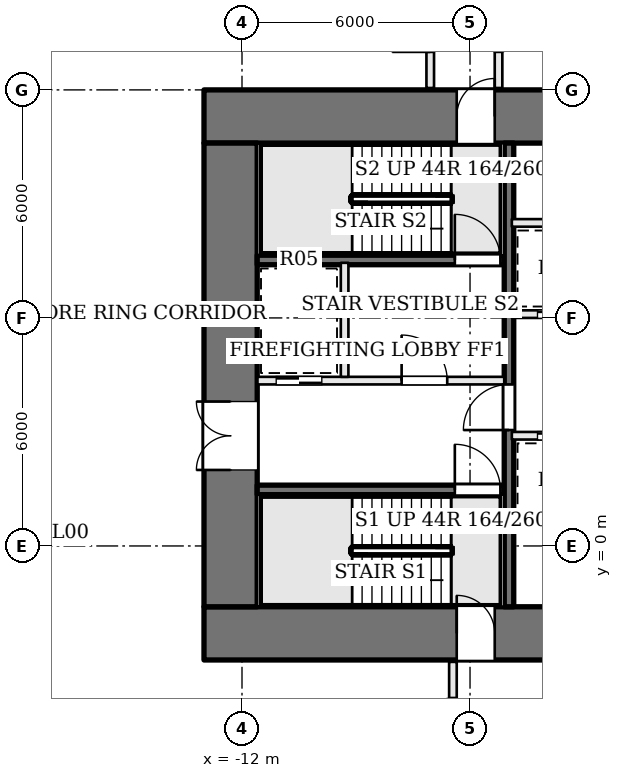
"""IFC4 building model, lengths in metres.
Left out: names, types, materials, properties, quantities, classifications, styles, units other than length and angle.
Written with IfcOpenShell. Run it as: python <this file> out.ifc"""

import sys

from ifc_helpers import new_model, si_unit, direction, frame, frame_2d, origin, place, context, subcontext, project, spatial, rectangle, extrude, element, fill, save


model = new_model("IFC4")
c1 = context("Model", 3, precision=1e-05, world=origin(), true_north=direction((0.0, 1.0)))
c2 = subcontext(c1, "Body", "Model", "MODEL_VIEW")
j1 = project(units=[si_unit("LENGTHUNIT", "METRE"), si_unit("PLANEANGLEUNIT", "RADIAN")], contexts=[c1])
p1 = place(None, origin())
s1 = spatial("IfcSite", under=j1, at=p1, CompositionType="ELEMENT")
p2 = place(p1, origin())
s2 = spatial("IfcBuilding", under=s1, at=p2, CompositionType="ELEMENT")
p3 = place(p2, origin())
s3 = spatial("IfcBuildingStorey", under=s2, at=p3, CompositionType="ELEMENT", Elevation=0.0)
p4 = place(p3, frame((-13.0, 11.3, 0.0), z_axis=(0.0, 0.0, 1.0), x_axis=(1.0, 0.0, 0.0)))
e1 = element("IfcWall", 1, at=p4, inside=s3, PredefinedType="SHEAR", context=c2, shape_type="SweptSolid", body=[
    extrude(rectangle(XDim=26.0, YDim=1.4, at=frame_2d((13.0, 0.0))), origin(), (0.0, 0.0, 1.0), 7.2),
])
p5 = place(p4, frame((8.975, 0.0, 0.0)))
e2 = element("IfcOpeningElement", 2, at=p5, cuts=e1, PredefinedType="OPENING", context=c2, shape_type="SweptSolid", body=[
    extrude(rectangle(XDim=0.7, YDim=2.1, at=frame_2d((0.35, 1.05))), frame((0.0, 0.71, 0.0), z_axis=(0.0, -1.0, 0.0), x_axis=(1.0, 0.0, 0.0)), (0.0, 0.0, 1.0), 1.42),
])
p6 = place(p4, frame((11.425, 0.0, 0.0)))
e3 = element("IfcOpeningElement", 3, at=p6, cuts=e1, PredefinedType="OPENING", context=c2, shape_type="SweptSolid", body=[
    extrude(rectangle(XDim=0.7, YDim=2.1, at=frame_2d((0.35, 1.05))), frame((0.0, 0.71, 0.0), z_axis=(0.0, -1.0, 0.0), x_axis=(1.0, 0.0, 0.0)), (0.0, 0.0, 1.0), 1.42),
])
p7 = place(p4, frame((13.725, 0.0, 0.0)))
e4 = element("IfcOpeningElement", 4, at=p7, cuts=e1, PredefinedType="OPENING", context=c2, shape_type="SweptSolid", body=[
    extrude(rectangle(XDim=1.0, YDim=2.1, at=frame_2d((0.5, 1.05))), frame((0.0, 0.71, 0.0), z_axis=(0.0, -1.0, 0.0), x_axis=(1.0, 0.0, 0.0)), (0.0, 0.0, 1.0), 1.42),
])
p8 = place(p4, frame((15.65, 0.0, 0.0)))
e5 = element("IfcOpeningElement", 5, at=p8, cuts=e1, PredefinedType="OPENING", context=c2, shape_type="SweptSolid", body=[
    extrude(rectangle(XDim=1.0, YDim=2.1, at=frame_2d((0.5, 1.05))), frame((0.0, 0.71, 0.0), z_axis=(0.0, -1.0, 0.0), x_axis=(1.0, 0.0, 0.0)), (0.0, 0.0, 1.0), 1.42),
])
p9 = place(p4, frame((6.65, 0.0, 0.0)))
e6 = element("IfcOpeningElement", 6, at=p9, cuts=e1, PredefinedType="OPENING", context=c2, shape_type="SweptSolid", body=[
    extrude(rectangle(XDim=1.0, YDim=2.1, at=frame_2d((0.5, 1.05))), frame((0.0, 0.71, 0.0), z_axis=(0.0, -1.0, 0.0), x_axis=(1.0, 0.0, 0.0)), (0.0, 0.0, 1.0), 1.42),
])
p10 = place(p4, frame((18.35, 0.0, 0.0)))
e7 = element("IfcOpeningElement", 7, at=p10, cuts=e1, PredefinedType="OPENING", context=c2, shape_type="SweptSolid", body=[
    extrude(rectangle(XDim=1.0, YDim=2.1, at=frame_2d((0.5, 1.05))), frame((0.0, 0.71, 0.0), z_axis=(0.0, -1.0, 0.0), x_axis=(1.0, 0.0, 0.0)), (0.0, 0.0, 1.0), 1.42),
])
p11 = place(p3, frame((-13.0, -2.3, 0.0), z_axis=(0.0, 0.0, 1.0), x_axis=(1.0, 0.0, 0.0)))
e8 = element("IfcWall", 8, at=p11, inside=s3, PredefinedType="SHEAR", context=c2, shape_type="SweptSolid", body=[
    extrude(rectangle(XDim=26.0, YDim=1.4, at=frame_2d((13.0, 0.0))), origin(), (0.0, 0.0, 1.0), 7.2),
])
p12 = place(p11, frame((9.275, 0.0, 0.0)))
e9 = element("IfcOpeningElement", 9, at=p12, cuts=e8, PredefinedType="OPENING", context=c2, shape_type="SweptSolid", body=[
    extrude(rectangle(XDim=0.9, YDim=2.1, at=frame_2d((0.45, 1.05))), frame((0.0, 0.71, 0.0), z_axis=(0.0, -1.0, 0.0), x_axis=(1.0, 0.0, 0.0)), (0.0, 0.0, 1.0), 1.42),
])
p13 = place(p11, frame((12.525, 0.0, 0.0)))
e10 = element("IfcOpeningElement", 10, at=p13, cuts=e8, PredefinedType="OPENING", context=c2, shape_type="SweptSolid", body=[
    extrude(rectangle(XDim=0.9, YDim=2.1, at=frame_2d((0.45, 1.05))), frame((0.0, 0.71, 0.0), z_axis=(0.0, -1.0, 0.0), x_axis=(1.0, 0.0, 0.0)), (0.0, 0.0, 1.0), 1.42),
])
p14 = place(p11, frame((15.0, 0.0, 0.0)))
e11 = element("IfcOpeningElement", 11, at=p14, cuts=e8, PredefinedType="OPENING", context=c2, shape_type="SweptSolid", body=[
    extrude(rectangle(XDim=1.0, YDim=2.1, at=frame_2d((0.5, 1.05))), frame((0.0, 0.71, 0.0), z_axis=(0.0, -1.0, 0.0), x_axis=(1.0, 0.0, 0.0)), (0.0, 0.0, 1.0), 1.42),
])
p15 = place(p11, frame((16.7, 0.0, 0.0)))
e12 = element("IfcOpeningElement", 12, at=p15, cuts=e8, PredefinedType="OPENING", context=c2, shape_type="SweptSolid", body=[
    extrude(rectangle(XDim=0.9, YDim=2.1, at=frame_2d((0.45, 1.05))), frame((0.0, 0.71, 0.0), z_axis=(0.0, -1.0, 0.0), x_axis=(1.0, 0.0, 0.0)), (0.0, 0.0, 1.0), 1.42),
])
p16 = place(p11, frame((6.65, 0.0, 0.0)))
e13 = element("IfcOpeningElement", 13, at=p16, cuts=e8, PredefinedType="OPENING", context=c2, shape_type="SweptSolid", body=[
    extrude(rectangle(XDim=1.0, YDim=2.1, at=frame_2d((0.5, 1.05))), frame((0.0, 0.71, 0.0), z_axis=(0.0, -1.0, 0.0), x_axis=(1.0, 0.0, 0.0)), (0.0, 0.0, 1.0), 1.42),
])
p17 = place(p11, frame((18.35, 0.0, 0.0)))
e14 = element("IfcOpeningElement", 14, at=p17, cuts=e8, PredefinedType="OPENING", context=c2, shape_type="SweptSolid", body=[
    extrude(rectangle(XDim=1.0, YDim=2.1, at=frame_2d((0.5, 1.05))), frame((0.0, 0.71, 0.0), z_axis=(0.0, -1.0, 0.0), x_axis=(1.0, 0.0, 0.0)), (0.0, 0.0, 1.0), 1.42),
])
p18 = place(p3, frame((-12.3, -1.6, 0.0), z_axis=(0.0, 0.0, 1.0), x_axis=(0.0, 1.0, 0.0)))
e15 = element("IfcWall", 15, at=p18, inside=s3, PredefinedType="SHEAR", context=c2, shape_type="SweptSolid", body=[
    extrude(rectangle(XDim=12.2, YDim=1.4, at=frame_2d((6.1, 0.0))), origin(), (0.0, 0.0, 1.0), 7.2),
])
p19 = place(p18, frame((3.6, 0.0, 0.0)))
e16 = element("IfcOpeningElement", 16, at=p19, cuts=e15, PredefinedType="OPENING", context=c2, shape_type="SweptSolid", body=[
    extrude(rectangle(XDim=1.8, YDim=2.1, at=frame_2d((0.9, 1.05))), frame((0.0, 0.71, 0.0), z_axis=(0.0, -1.0, 0.0), x_axis=(1.0, 0.0, 0.0)), (0.0, 0.0, 1.0), 1.42),
])
p20 = place(p3, frame((-11.6, 1.475, 0.0), z_axis=(0.0, 0.0, 1.0), x_axis=(1.0, 0.0, 0.0)))
e17 = element("IfcWall", 17, at=p20, inside=s3, PredefinedType="SOLIDWALL", context=c2, shape_type="SweptSolid", body=[
    extrude(rectangle(XDim=6.5, YDim=0.25, at=frame_2d((3.25, 0.0))), origin(), (0.0, 0.0, 1.0), 6.95),
])
p21 = place(p20, frame((5.2, 0.0, 0.0)))
e18 = element("IfcOpeningElement", 18, at=p21, cuts=e17, PredefinedType="OPENING", context=c2, shape_type="SweptSolid", body=[
    extrude(rectangle(XDim=1.2, YDim=2.1, at=frame_2d((0.6, 1.05))), frame((0.0, 0.135, 0.0), z_axis=(0.0, -1.0, 0.0), x_axis=(1.0, 0.0, 0.0)), (0.0, 0.0, 1.0), 0.27),
])
p22 = place(p3, frame((-11.6, 4.35, 0.0), z_axis=(0.0, 0.0, 1.0), x_axis=(1.0, 0.0, 0.0)))
e19 = element("IfcWall", 19, at=p22, inside=s3, PredefinedType="SOLIDWALL", context=c2, shape_type="SweptSolid", body=[
    extrude(rectangle(XDim=6.5, YDim=0.2, at=frame_2d((3.25, 0.0))), origin(), (0.0, 0.0, 1.0), 6.95),
])
p23 = place(p22, frame((3.8, 0.0, 0.0)))
e20 = element("IfcOpeningElement", 20, at=p23, cuts=e19, PredefinedType="OPENING", context=c2, shape_type="SweptSolid", body=[
    extrude(rectangle(XDim=1.2, YDim=2.1, at=frame_2d((0.6, 1.05))), frame((0.0, 0.11, 0.0), z_axis=(0.0, -1.0, 0.0), x_axis=(1.0, 0.0, 0.0)), (0.0, 0.0, 1.0), 0.22),
])
p24 = place(p22, frame((0.5, 0.0, 0.0)))
e21 = element("IfcOpeningElement", 21, at=p24, cuts=e19, PredefinedType="OPENING", context=c2, shape_type="SweptSolid", body=[
    extrude(rectangle(XDim=1.2, YDim=2.1, at=frame_2d((0.6, 1.05))), frame((0.0, 0.11, 0.0), z_axis=(0.0, -1.0, 0.0), x_axis=(1.0, 0.0, 0.0)), (0.0, 0.0, 1.0), 0.22),
])
p25 = place(p3, frame((-11.6, 7.525, 0.0), z_axis=(0.0, 0.0, 1.0), x_axis=(1.0, 0.0, 0.0)))
e22 = element("IfcWall", 22, at=p25, inside=s3, PredefinedType="SOLIDWALL", context=c2, shape_type="SweptSolid", body=[
    extrude(rectangle(XDim=6.5, YDim=0.25, at=frame_2d((3.25, 0.0))), origin(), (0.0, 0.0, 1.0), 6.95),
])
p26 = place(p25, frame((5.2, 0.0, 0.0)))
e23 = element("IfcOpeningElement", 23, at=p26, cuts=e22, PredefinedType="OPENING", context=c2, shape_type="SweptSolid", body=[
    extrude(rectangle(XDim=1.2, YDim=2.1, at=frame_2d((0.6, 1.05))), frame((0.0, 0.135, 0.0), z_axis=(0.0, -1.0, 0.0), x_axis=(1.0, 0.0, 0.0)), (0.0, 0.0, 1.0), 0.27),
])
p27 = place(p3, frame((-9.3, 4.45, 0.0), z_axis=(0.0, 0.0, 1.0), x_axis=(0.0, 1.0, 0.0)))
e24 = element("IfcWall", 24, at=p27, inside=s3, PredefinedType="SOLIDWALL", context=c2, shape_type="SweptSolid", body=[
    extrude(rectangle(XDim=3.0, YDim=0.2, at=frame_2d((1.5, 0.0))), origin(), (0.0, 0.0, 1.0), 6.95),
])
p28 = place(p3, frame((-4.975, -1.6, 0.0), z_axis=(0.0, 0.0, 1.0), x_axis=(0.0, 1.0, 0.0)))
e25 = element("IfcWall", 25, at=p28, inside=s3, PredefinedType="SOLIDWALL", context=c2, shape_type="SweptSolid", body=[
    extrude(rectangle(XDim=12.2, YDim=0.25, at=frame_2d((6.1, 0.0))), origin(), (0.0, 0.0, 1.0), 6.95),
])
p29 = place(p28, frame((4.65, 0.0, 0.0)))
e26 = element("IfcOpeningElement", 26, at=p29, cuts=e25, PredefinedType="OPENING", context=c2, shape_type="SweptSolid", body=[
    extrude(rectangle(XDim=1.2, YDim=2.1, at=frame_2d((0.6, 1.05))), frame((0.0, 0.135, 0.0), z_axis=(0.0, -1.0, 0.0), x_axis=(1.0, 0.0, 0.0)), (0.0, 0.0, 1.0), 0.27),
])
p30 = place(p3, frame((-4.9, 0.5, 0.0), z_axis=(0.0, 0.0, 1.0), x_axis=(1.0, 0.0, 0.0)))
e27 = element("IfcWall", 27, at=p30, inside=s3, PredefinedType="SOLIDWALL", context=c2, shape_type="SweptSolid", body=[
    extrude(rectangle(XDim=9.8, YDim=0.2, at=frame_2d((4.9, 0.0))), origin(), (0.0, 0.0, 1.0), 6.95),
])
p31 = place(p3, frame((-4.9, 2.9, 0.0), z_axis=(0.0, 0.0, 1.0), x_axis=(1.0, 0.0, 0.0)))
e28 = element("IfcWall", 28, at=p31, inside=s3, PredefinedType="SOLIDWALL", context=c2, shape_type="SweptSolid", body=[
    extrude(rectangle(XDim=9.8, YDim=0.2, at=frame_2d((4.9, 0.0))), origin(), (0.0, 0.0, 1.0), 6.95),
])
p32 = place(p31, frame((0.675, 0.0, 0.0)))
e29 = element("IfcOpeningElement", 29, at=p32, cuts=e28, PredefinedType="OPENING", context=c2, shape_type="SweptSolid", body=[
    extrude(rectangle(XDim=1.1, YDim=2.1, at=frame_2d((0.55, 1.05))), frame((0.0, 0.11, 0.0), z_axis=(0.0, -1.0, 0.0), x_axis=(1.0, 0.0, 0.0)), (0.0, 0.0, 1.0), 0.22),
])
p33 = place(p31, frame((3.125, 0.0, 0.0)))
e30 = element("IfcOpeningElement", 30, at=p33, cuts=e28, PredefinedType="OPENING", context=c2, shape_type="SweptSolid", body=[
    extrude(rectangle(XDim=1.1, YDim=2.1, at=frame_2d((0.55, 1.05))), frame((0.0, 0.11, 0.0), z_axis=(0.0, -1.0, 0.0), x_axis=(1.0, 0.0, 0.0)), (0.0, 0.0, 1.0), 0.22),
])
p34 = place(p31, frame((5.575, 0.0, 0.0)))
e31 = element("IfcOpeningElement", 31, at=p34, cuts=e28, PredefinedType="OPENING", context=c2, shape_type="SweptSolid", body=[
    extrude(rectangle(XDim=1.1, YDim=2.1, at=frame_2d((0.55, 1.05))), frame((0.0, 0.11, 0.0), z_axis=(0.0, -1.0, 0.0), x_axis=(1.0, 0.0, 0.0)), (0.0, 0.0, 1.0), 0.22),
])
p35 = place(p31, frame((8.025, 0.0, 0.0)))
e32 = element("IfcOpeningElement", 32, at=p35, cuts=e28, PredefinedType="OPENING", context=c2, shape_type="SweptSolid", body=[
    extrude(rectangle(XDim=1.1, YDim=2.1, at=frame_2d((0.55, 1.05))), frame((0.0, 0.11, 0.0), z_axis=(0.0, -1.0, 0.0), x_axis=(1.0, 0.0, 0.0)), (0.0, 0.0, 1.0), 0.22),
])
p36 = place(p3, frame((-4.9, 6.1, 0.0), z_axis=(0.0, 0.0, 1.0), x_axis=(1.0, 0.0, 0.0)))
e33 = element("IfcWall", 33, at=p36, inside=s3, PredefinedType="SOLIDWALL", context=c2, shape_type="SweptSolid", body=[
    extrude(rectangle(XDim=9.8, YDim=0.2, at=frame_2d((4.9, 0.0))), origin(), (0.0, 0.0, 1.0), 6.95),
])
p37 = place(p36, frame((0.675, 0.0, 0.0)))
e34 = element("IfcOpeningElement", 34, at=p37, cuts=e33, PredefinedType="OPENING", context=c2, shape_type="SweptSolid", body=[
    extrude(rectangle(XDim=1.1, YDim=2.1, at=frame_2d((0.55, 1.05))), frame((0.0, 0.11, 0.0), z_axis=(0.0, -1.0, 0.0), x_axis=(1.0, 0.0, 0.0)), (0.0, 0.0, 1.0), 0.22),
])
p38 = place(p36, frame((3.125, 0.0, 0.0)))
e35 = element("IfcOpeningElement", 35, at=p38, cuts=e33, PredefinedType="OPENING", context=c2, shape_type="SweptSolid", body=[
    extrude(rectangle(XDim=1.1, YDim=2.1, at=frame_2d((0.55, 1.05))), frame((0.0, 0.11, 0.0), z_axis=(0.0, -1.0, 0.0), x_axis=(1.0, 0.0, 0.0)), (0.0, 0.0, 1.0), 0.22),
])
p39 = place(p36, frame((5.575, 0.0, 0.0)))
e36 = element("IfcOpeningElement", 36, at=p39, cuts=e33, PredefinedType="OPENING", context=c2, shape_type="SweptSolid", body=[
    extrude(rectangle(XDim=1.1, YDim=2.1, at=frame_2d((0.55, 1.05))), frame((0.0, 0.11, 0.0), z_axis=(0.0, -1.0, 0.0), x_axis=(1.0, 0.0, 0.0)), (0.0, 0.0, 1.0), 0.22),
])
p40 = place(p36, frame((8.025, 0.0, 0.0)))
e37 = element("IfcOpeningElement", 37, at=p40, cuts=e33, PredefinedType="OPENING", context=c2, shape_type="SweptSolid", body=[
    extrude(rectangle(XDim=1.1, YDim=2.1, at=frame_2d((0.55, 1.05))), frame((0.0, 0.11, 0.0), z_axis=(0.0, -1.0, 0.0), x_axis=(1.0, 0.0, 0.0)), (0.0, 0.0, 1.0), 0.22),
])
p41 = place(p3, frame((-4.9, 8.5, 0.0), z_axis=(0.0, 0.0, 1.0), x_axis=(1.0, 0.0, 0.0)))
e38 = element("IfcWall", 38, at=p41, inside=s3, PredefinedType="SOLIDWALL", context=c2, shape_type="SweptSolid", body=[
    extrude(rectangle(XDim=9.8, YDim=0.2, at=frame_2d((4.9, 0.0))), origin(), (0.0, 0.0, 1.0), 6.95),
])
p42 = place(p3, frame((-6.45, -22.097, 0.0), z_axis=(0.0, 0.0, 1.0), x_axis=(0.0, 1.0, 0.0)))
e39 = element("IfcWall", 39, at=p42, inside=s3, PredefinedType="PARTITIONING", context=c2, shape_type="SweptSolid", body=[
    extrude(rectangle(XDim=19.047, YDim=0.2, at=frame_2d((9.523, 0.0))), origin(), (0.0, 0.0, 1.0), 6.23),
])
p43 = place(p42, frame((17.097, 0.0, 0.0)))
e40 = element("IfcOpeningElement", 40, at=p43, cuts=e39, PredefinedType="OPENING", context=c2, shape_type="SweptSolid", body=[
    extrude(rectangle(XDim=1.0, YDim=2.1, at=frame_2d((0.5, 1.05))), frame((0.0, 0.11, 0.0), z_axis=(0.0, -1.0, 0.0), x_axis=(1.0, 0.0, 0.0)), (0.0, 0.0, 1.0), 0.22),
])
p44 = place(p3, frame((-7.047, 12.05, 0.0), z_axis=(0.0, 0.0, 1.0), x_axis=(0.0, 1.0, 0.0)))
e41 = element("IfcWall", 41, at=p44, inside=s3, PredefinedType="PARTITIONING", context=c2, shape_type="SweptSolid", body=[
    extrude(rectangle(XDim=9.98, YDim=0.2, at=frame_2d((4.99, 0.0))), origin(), (0.0, 0.0, 1.0), 6.23),
])
p45 = place(p44, frame((0.95, 0.0, 0.0)))
e42 = element("IfcOpeningElement", 42, at=p45, cuts=e41, PredefinedType="OPENING", context=c2, shape_type="SweptSolid", body=[
    extrude(rectangle(XDim=1.0, YDim=2.1, at=frame_2d((0.5, 1.05))), frame((0.0, 0.11, 0.0), z_axis=(0.0, -1.0, 0.0), x_axis=(1.0, 0.0, 0.0)), (0.0, 0.0, 1.0), 0.22),
])
p46 = place(p3, frame((-5.25, 22.21, 0.0), z_axis=(0.0, 0.0, 1.0), x_axis=(0.0, -1.0, 0.0)))
e43 = element("IfcWall", 43, at=p46, inside=s3, PredefinedType="PARTITIONING", context=c2, shape_type="SweptSolid", body=[
    extrude(rectangle(XDim=10.16, YDim=0.2, at=frame_2d((5.08, 0.0))), origin(), (0.0, 0.0, 1.0), 6.23),
])
p47 = place(p46, frame((8.21, 0.0, 0.0)))
e44 = element("IfcOpeningElement", 44, at=p47, cuts=e43, PredefinedType="OPENING", context=c2, shape_type="SweptSolid", body=[
    extrude(rectangle(XDim=1.0, YDim=2.1, at=frame_2d((0.5, 1.05))), frame((0.0, 0.11, 0.0), z_axis=(0.0, -1.0, 0.0), x_axis=(1.0, 0.0, 0.0)), (0.0, 0.0, 1.0), 0.22),
])
p48 = place(p19, origin())
e45 = element("IfcDoor", 45, at=p48, inside=s3, OperationType="DOUBLE_DOOR_SINGLE_SWING", PredefinedType="DOOR", context=c2, shape_type="SweptSolid", body=[
    extrude(rectangle(XDim=1.8, YDim=2.1, at=frame_2d((0.9, 1.05))), frame((0.0, 0.025, 0.0), z_axis=(0.0, -1.0, 0.0), x_axis=(1.0, 0.0, 0.0)), (0.0, 0.0, 1.0), 0.05),
])
fill(e16, e45)
p49 = place(p29, origin())
e46 = element("IfcDoor", 46, at=p49, inside=s3, OperationType="SINGLE_SWING_LEFT", PredefinedType="DOOR", context=c2, shape_type="SweptSolid", body=[
    extrude(rectangle(XDim=1.2, YDim=2.1, at=frame_2d((0.6, 1.05))), frame((0.0, 0.025, 0.0), z_axis=(0.0, -1.0, 0.0), x_axis=(1.0, 0.0, 0.0)), (0.0, 0.0, 1.0), 0.05),
])
fill(e26, e46)
p50 = place(p23, origin())
e47 = element("IfcDoor", 47, at=p50, inside=s3, OperationType="SINGLE_SWING_LEFT", PredefinedType="DOOR", context=c2, shape_type="SweptSolid", body=[
    extrude(rectangle(XDim=1.2, YDim=2.1, at=frame_2d((0.6, 1.05))), frame((0.0, 0.025, 0.0), z_axis=(0.0, -1.0, 0.0), x_axis=(1.0, 0.0, 0.0)), (0.0, 0.0, 1.0), 0.05),
])
fill(e20, e47)
p51 = place(p21, origin())
e48 = element("IfcDoor", 48, at=p51, inside=s3, OperationType="SINGLE_SWING_LEFT", PredefinedType="DOOR", context=c2, shape_type="SweptSolid", body=[
    extrude(rectangle(XDim=1.2, YDim=2.1, at=frame_2d((0.6, 1.05))), frame((0.0, 0.025, 0.0), z_axis=(0.0, -1.0, 0.0), x_axis=(1.0, 0.0, 0.0)), (0.0, 0.0, 1.0), 0.05),
])
fill(e18, e48)
p52 = place(p26, origin())
e49 = element("IfcDoor", 49, at=p52, inside=s3, OperationType="SINGLE_SWING_LEFT", PredefinedType="DOOR", context=c2, shape_type="SweptSolid", body=[
    extrude(rectangle(XDim=1.2, YDim=2.1, at=frame_2d((0.6, 1.05))), frame((0.0, 0.025, 0.0), z_axis=(0.0, -1.0, 0.0), x_axis=(1.0, 0.0, 0.0)), (0.0, 0.0, 1.0), 0.05),
])
fill(e23, e49)
p53 = place(p24, origin())
e50 = element("IfcDoor", 50, at=p53, inside=s3, OperationType="SLIDING_TO_RIGHT", PredefinedType="DOOR", context=c2, shape_type="SweptSolid", body=[
    extrude(rectangle(XDim=1.2, YDim=2.1, at=frame_2d((0.6, 1.05))), frame((0.0, 0.025, 0.0), z_axis=(0.0, -1.0, 0.0), x_axis=(1.0, 0.0, 0.0)), (0.0, 0.0, 1.0), 0.05),
])
fill(e21, e50)
p54 = place(p32, origin())
e51 = element("IfcDoor", 51, at=p54, inside=s3, OperationType="SLIDING_TO_RIGHT", PredefinedType="DOOR", context=c2, shape_type="SweptSolid", body=[
    extrude(rectangle(XDim=1.1, YDim=2.1, at=frame_2d((0.55, 1.05))), frame((0.0, 0.025, 0.0), z_axis=(0.0, -1.0, 0.0), x_axis=(1.0, 0.0, 0.0)), (0.0, 0.0, 1.0), 0.05),
])
fill(e29, e51)
p55 = place(p37, origin())
e52 = element("IfcDoor", 52, at=p55, inside=s3, OperationType="SLIDING_TO_RIGHT", PredefinedType="DOOR", context=c2, shape_type="SweptSolid", body=[
    extrude(rectangle(XDim=1.1, YDim=2.1, at=frame_2d((0.55, 1.05))), frame((0.0, 0.025, 0.0), z_axis=(0.0, -1.0, 0.0), x_axis=(1.0, 0.0, 0.0)), (0.0, 0.0, 1.0), 0.05),
])
fill(e34, e52)
p56 = place(p16, origin())
e53 = element("IfcDoor", 53, at=p56, inside=s3, OperationType="SINGLE_SWING_LEFT", PredefinedType="DOOR", context=c2, shape_type="SweptSolid", body=[
    extrude(rectangle(XDim=1.0, YDim=2.1, at=frame_2d((0.5, 1.05))), frame((0.0, 0.025, 0.0), z_axis=(0.0, -1.0, 0.0), x_axis=(1.0, 0.0, 0.0)), (0.0, 0.0, 1.0), 0.05),
])
fill(e13, e53)
p57 = place(p9, origin())
e54 = element("IfcDoor", 54, at=p57, inside=s3, OperationType="SINGLE_SWING_RIGHT", PredefinedType="DOOR", context=c2, shape_type="SweptSolid", body=[
    extrude(rectangle(XDim=1.0, YDim=2.1, at=frame_2d((0.5, 1.05))), frame((0.0, 0.025, 0.0), z_axis=(0.0, -1.0, 0.0), x_axis=(1.0, 0.0, 0.0)), (0.0, 0.0, 1.0), 0.05),
])
fill(e6, e54)
save(model, sys.argv[1])
